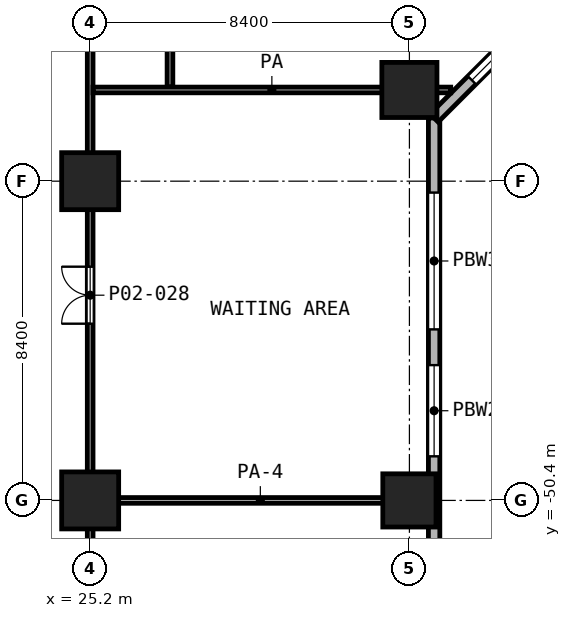
"""IFC4 building model, lengths in metres.
Left out: names, types, materials, properties, quantities, classifications, styles, units other than length and angle.
Written with IfcOpenShell. Run it as: python <this file> out.ifc"""

import sys

from ifc_helpers import new_model, si_unit, direction, frame, frame_2d, origin, origin_2d, place, context, subcontext, project, spatial, rectangle, extrude, element, fill, save


model = new_model("IFC4")
c1 = context("Model", 3, precision=1e-05, world=origin(), true_north=direction((0.0, 1.0)))
c2 = subcontext(c1, "Body", "Model", "MODEL_VIEW")
j1 = project(units=[si_unit("LENGTHUNIT", "METRE"), si_unit("PLANEANGLEUNIT", "RADIAN")], contexts=[c1])
p1 = place(None, origin())
s1 = spatial("IfcSite", under=j1, at=p1, CompositionType="ELEMENT")
p2 = place(p1, origin())
s2 = spatial("IfcBuilding", under=s1, at=p2, CompositionType="ELEMENT")
p3 = place(p2, frame((0.0, 0.0, 7.0)))
s3 = spatial("IfcBuildingStorey", under=s2, at=p3, CompositionType="ELEMENT", Elevation=7.0)
p4 = place(p3, frame((33.6, -39.6, 0.0), z_axis=(0.0, 0.0, 1.0), x_axis=(1.0, 0.0, 0.0)))
e1 = element("IfcColumn", 1, at=p4, inside=s3, PredefinedType="COLUMN", context=c2, shape_type="SweptSolid", body=[
    extrude(rectangle(XDim=1.45, YDim=1.45, at=origin_2d()), origin(), (0.0, 0.0, 1.0), 5.6),
])
for number, where, z_axis, x_axis in (
    (2, (25.2, -42.0, 0.0), (0.0, 0.0, 1.0), (1.0, 0.0, 0.0)),
    (3, (25.2, -50.4, 0.0), (0.0, 0.0, 1.0), (1.0, 0.0, 0.0)),
):
    element("IfcColumn", number, at=place(p3, frame(where, z_axis=z_axis, x_axis=x_axis)), inside=s3, PredefinedType="COLUMN", context=c2, shape_type="SweptSolid", body=[
        extrude(rectangle(XDim=1.5, YDim=1.5, at=origin_2d()), origin(), (0.0, 0.0, 1.0), 5.6),
    ])
p5 = place(p3, frame((33.6, -50.4, 0.0), z_axis=(0.0, 0.0, 1.0), x_axis=(1.0, 0.0, 0.0)))
e4 = element("IfcColumn", 4, at=p5, inside=s3, PredefinedType="COLUMN", context=c2, shape_type="SweptSolid", body=[
    extrude(rectangle(XDim=1.4, YDim=1.4, at=origin_2d()), origin(), (0.0, 0.0, 1.0), 5.6),
])
p6 = place(p3, frame((34.25, -78.738, 0.0), z_axis=(0.0, 0.0, 1.0), x_axis=(0.0, 1.0, 0.0)))
e5 = element("IfcWall", 5, at=p6, inside=s3, PredefinedType="SOLIDWALL", context=c2, shape_type="SweptSolid", body=[
    extrude(rectangle(XDim=38.4, YDim=0.3, at=frame_2d((19.2, 0.0))), origin(), (0.0, 0.0, 1.0), 5.25),
])
p7 = place(p6, frame((1.61, 0.0, 0.9)))
e6 = element("IfcOpeningElement", 6, at=p7, cuts=e5, PredefinedType="OPENING", context=c2, shape_type="SweptSolid", body=[
    extrude(rectangle(XDim=1.2, YDim=3.0, at=frame_2d((0.6, 1.5))), frame((0.0, 0.16, 0.0), z_axis=(0.0, -1.0, 0.0), x_axis=(1.0, 0.0, 0.0)), (0.0, 0.0, 1.0), 0.32),
])
p8 = place(p6, frame((3.438, 0.0, 0.9)))
e7 = element("IfcOpeningElement", 7, at=p8, cuts=e5, PredefinedType="OPENING", context=c2, shape_type="SweptSolid", body=[
    extrude(rectangle(XDim=3.6, YDim=3.0, at=frame_2d((1.8, 1.5))), frame((0.0, 0.16, 0.0), z_axis=(0.0, -1.0, 0.0), x_axis=(1.0, 0.0, 0.0)), (0.0, 0.0, 1.0), 0.32),
])
p9 = place(p6, frame((8.203, 0.0, 0.9)))
e8 = element("IfcOpeningElement", 8, at=p9, cuts=e5, PredefinedType="OPENING", context=c2, shape_type="SweptSolid", body=[
    extrude(rectangle(XDim=2.4, YDim=3.0, at=frame_2d((1.2, 1.5))), frame((0.0, 0.16, 0.0), z_axis=(0.0, -1.0, 0.0), x_axis=(1.0, 0.0, 0.0)), (0.0, 0.0, 1.0), 0.32),
])
p10 = place(p6, frame((12.623, 0.0, 0.9)))
e9 = element("IfcOpeningElement", 9, at=p10, cuts=e5, PredefinedType="OPENING", context=c2, shape_type="SweptSolid", body=[
    extrude(rectangle(XDim=2.4, YDim=3.0, at=frame_2d((1.2, 1.5))), frame((0.0, 0.16, 0.0), z_axis=(0.0, -1.0, 0.0), x_axis=(1.0, 0.0, 0.0)), (0.0, 0.0, 1.0), 0.32),
])
p11 = place(p6, frame((16.378, 0.0, 0.9)))
e10 = element("IfcOpeningElement", 10, at=p11, cuts=e5, PredefinedType="OPENING", context=c2, shape_type="SweptSolid", body=[
    extrude(rectangle(XDim=2.4, YDim=3.0, at=frame_2d((1.2, 1.5))), frame((0.0, 0.16, 0.0), z_axis=(0.0, -1.0, 0.0), x_axis=(1.0, 0.0, 0.0)), (0.0, 0.0, 1.0), 0.32),
])
p12 = place(p6, frame((21.098, 0.0, 0.9)))
e11 = element("IfcOpeningElement", 11, at=p12, cuts=e5, PredefinedType="OPENING", context=c2, shape_type="SweptSolid", body=[
    extrude(rectangle(XDim=2.4, YDim=3.0, at=frame_2d((1.2, 1.5))), frame((0.0, 0.16, 0.0), z_axis=(0.0, -1.0, 0.0), x_axis=(1.0, 0.0, 0.0)), (0.0, 0.0, 1.0), 0.32),
])
p13 = place(p6, frame((24.778, 0.0, 0.9)))
e12 = element("IfcOpeningElement", 12, at=p13, cuts=e5, PredefinedType="OPENING", context=c2, shape_type="SweptSolid", body=[
    extrude(rectangle(XDim=2.4, YDim=3.0, at=frame_2d((1.2, 1.5))), frame((0.0, 0.16, 0.0), z_axis=(0.0, -1.0, 0.0), x_axis=(1.0, 0.0, 0.0)), (0.0, 0.0, 1.0), 0.32),
])
p14 = place(p6, frame((29.498, 0.0, 0.9)))
e13 = element("IfcOpeningElement", 13, at=p14, cuts=e5, PredefinedType="OPENING", context=c2, shape_type="SweptSolid", body=[
    extrude(rectangle(XDim=2.4, YDim=3.0, at=frame_2d((1.2, 1.5))), frame((0.0, 0.16, 0.0), z_axis=(0.0, -1.0, 0.0), x_axis=(1.0, 0.0, 0.0)), (0.0, 0.0, 1.0), 0.32),
])
p15 = place(p6, frame((32.838, 0.0, 0.9)))
e14 = element("IfcOpeningElement", 14, at=p15, cuts=e5, PredefinedType="OPENING", context=c2, shape_type="SweptSolid", body=[
    extrude(rectangle(XDim=3.6, YDim=3.0, at=frame_2d((1.8, 1.5))), frame((0.0, 0.16, 0.0), z_axis=(0.0, -1.0, 0.0), x_axis=(1.0, 0.0, 0.0)), (0.0, 0.0, 1.0), 0.32),
])
p16 = place(p3, frame((34.25, -40.338, 0.0), z_axis=(0.0, 0.0, 1.0), x_axis=(0.707106781187, 0.707106781187, 0.0)))
e15 = element("IfcWall", 15, at=p16, inside=s3, PredefinedType="SOLIDWALL", context=c2, shape_type="SweptSolid", body=[
    extrude(rectangle(XDim=8.61, YDim=0.3, at=frame_2d((4.305, 0.0))), origin(), (0.0, 0.0, 1.0), 5.25),
])
p17 = place(p16, frame((1.406, 0.0, 0.9)))
e16 = element("IfcOpeningElement", 16, at=p17, cuts=e15, PredefinedType="OPENING", context=c2, shape_type="SweptSolid", body=[
    extrude(rectangle(XDim=2.4, YDim=3.0, at=frame_2d((1.2, 1.5))), frame((0.0, 0.16, 0.0), z_axis=(0.0, -1.0, 0.0), x_axis=(1.0, 0.0, 0.0)), (0.0, 0.0, 1.0), 0.32),
])
p18 = place(p16, frame((4.803, 0.0, 0.9)))
e17 = element("IfcOpeningElement", 17, at=p18, cuts=e15, PredefinedType="OPENING", context=c2, shape_type="SweptSolid", body=[
    extrude(rectangle(XDim=2.4, YDim=3.0, at=frame_2d((1.2, 1.5))), frame((0.0, 0.16, 0.0), z_axis=(0.0, -1.0, 0.0), x_axis=(1.0, 0.0, 0.0)), (0.0, 0.0, 1.0), 0.32),
])
p19 = place(p3, frame((25.275, -50.4, 0.0), z_axis=(0.0, 0.0, 1.0), x_axis=(1.0, 0.0, 0.0)))
e18 = element("IfcWall", 18, at=p19, inside=s3, PredefinedType="PARTITIONING", context=c2, shape_type="SweptSolid", body=[
    extrude(rectangle(XDim=8.805, YDim=0.15, at=frame_2d((4.403, 0.0))), origin(), (0.0, 0.0, 1.0), 4.35),
])
p20 = place(p3, frame((25.275, -39.6, 0.0), z_axis=(0.0, 0.0, 1.0), x_axis=(1.0, 0.0, 0.0)))
e19 = element("IfcWall", 19, at=p20, inside=s3, PredefinedType="PARTITIONING", context=c2, shape_type="SweptSolid", body=[
    extrude(rectangle(XDim=9.412, YDim=0.15, at=frame_2d((4.706, 0.0))), origin(), (0.0, 0.0, 1.0), 5.25),
])
p21 = place(p3, frame((25.2, -81.3, 0.0), z_axis=(0.0, 0.0, 1.0), x_axis=(0.0, 1.0, 0.0)))
e20 = element("IfcWall", 20, at=p21, inside=s3, PredefinedType="PARTITIONING", context=c2, shape_type="SweptSolid", body=[
    extrude(rectangle(XDim=46.95, YDim=0.15, at=frame_2d((23.475, 0.0))), origin(), (0.0, 0.0, 1.0), 5.25),
])
p22 = place(p21, frame((35.55, 0.0, 0.0)))
e21 = element("IfcOpeningElement", 21, at=p22, cuts=e20, PredefinedType="OPENING", context=c2, shape_type="SweptSolid", body=[
    extrude(rectangle(XDim=1.5, YDim=2.1, at=frame_2d((0.75, 1.05))), frame((0.0, 0.085, 0.0), z_axis=(0.0, -1.0, 0.0), x_axis=(1.0, 0.0, 0.0)), (0.0, 0.0, 1.0), 0.17),
])
p23 = place(p21, frame((26.2, 0.0, 0.0)))
e22 = element("IfcOpeningElement", 22, at=p23, cuts=e20, PredefinedType="OPENING", context=c2, shape_type="SweptSolid", body=[
    extrude(rectangle(XDim=1.0, YDim=2.1, at=frame_2d((0.5, 1.05))), frame((0.0, 0.085, 0.0), z_axis=(0.0, -1.0, 0.0), x_axis=(1.0, 0.0, 0.0)), (0.0, 0.0, 1.0), 0.17),
])
p24 = place(p21, frame((19.75, 0.0, 0.0)))
e23 = element("IfcOpeningElement", 23, at=p24, cuts=e20, PredefinedType="OPENING", context=c2, shape_type="SweptSolid", body=[
    extrude(rectangle(XDim=1.0, YDim=2.1, at=frame_2d((0.5, 1.05))), frame((0.0, 0.085, 0.0), z_axis=(0.0, -1.0, 0.0), x_axis=(1.0, 0.0, 0.0)), (0.0, 0.0, 1.0), 0.17),
])
p25 = place(p21, frame((15.55, 0.0, 0.0)))
e24 = element("IfcOpeningElement", 24, at=p25, cuts=e20, PredefinedType="OPENING", context=c2, shape_type="SweptSolid", body=[
    extrude(rectangle(XDim=1.0, YDim=2.1, at=frame_2d((0.5, 1.05))), frame((0.0, 0.085, 0.0), z_axis=(0.0, -1.0, 0.0), x_axis=(1.0, 0.0, 0.0)), (0.0, 0.0, 1.0), 0.17),
])
p26 = place(p21, frame((11.8, 0.0, 0.0)))
e25 = element("IfcOpeningElement", 25, at=p26, cuts=e20, PredefinedType="OPENING", context=c2, shape_type="SweptSolid", body=[
    extrude(rectangle(XDim=1.0, YDim=2.1, at=frame_2d((0.5, 1.05))), frame((0.0, 0.085, 0.0), z_axis=(0.0, -1.0, 0.0), x_axis=(1.0, 0.0, 0.0)), (0.0, 0.0, 1.0), 0.17),
])
p27 = place(p21, frame((6.5, 0.0, 0.0)))
e26 = element("IfcOpeningElement", 26, at=p27, cuts=e20, PredefinedType="OPENING", context=c2, shape_type="SweptSolid", body=[
    extrude(rectangle(XDim=1.0, YDim=2.1, at=frame_2d((0.5, 1.05))), frame((0.0, 0.085, 0.0), z_axis=(0.0, -1.0, 0.0), x_axis=(1.0, 0.0, 0.0)), (0.0, 0.0, 1.0), 0.17),
])
p28 = place(p3, frame((27.3, -39.525, 0.0), z_axis=(0.0, 0.0, 1.0), x_axis=(0.0, 1.0, 0.0)))
e27 = element("IfcWall", 27, at=p28, inside=s3, PredefinedType="PARTITIONING", context=c2, shape_type="SweptSolid", body=[
    extrude(rectangle(XDim=14.25, YDim=0.15, at=frame_2d((7.125, 0.0))), origin(), (0.0, 0.0, 1.0), 5.25),
])
p29 = place(p14, origin())
e28 = element("IfcWindow", 28, at=p29, inside=s3, PartitioningType="SINGLE_PANEL", PredefinedType="WINDOW", context=c2, shape_type="SweptSolid", body=[
    extrude(rectangle(XDim=2.4, YDim=3.0, at=frame_2d((1.2, 1.5))), frame((0.0, 0.03, 0.0), z_axis=(0.0, -1.0, 0.0), x_axis=(1.0, 0.0, 0.0)), (0.0, 0.0, 1.0), 0.06),
])
fill(e13, e28)
p30 = place(p15, origin())
e29 = element("IfcWindow", 29, at=p30, inside=s3, PartitioningType="SINGLE_PANEL", PredefinedType="WINDOW", context=c2, shape_type="SweptSolid", body=[
    extrude(rectangle(XDim=3.6, YDim=3.0, at=frame_2d((1.8, 1.5))), frame((0.0, 0.03, 0.0), z_axis=(0.0, -1.0, 0.0), x_axis=(1.0, 0.0, 0.0)), (0.0, 0.0, 1.0), 0.06),
])
fill(e14, e29)
p31 = place(p17, origin())
e30 = element("IfcWindow", 30, at=p31, inside=s3, PartitioningType="SINGLE_PANEL", PredefinedType="WINDOW", context=c2, shape_type="SweptSolid", body=[
    extrude(rectangle(XDim=2.4, YDim=3.0, at=frame_2d((1.2, 1.5))), frame((0.0, 0.03, 0.0), z_axis=(0.0, -1.0, 0.0), x_axis=(1.0, 0.0, 0.0)), (0.0, 0.0, 1.0), 0.06),
])
fill(e16, e30)
p32 = place(p22, origin())
e31 = element("IfcDoor", 31, at=p32, inside=s3, OperationType="DOUBLE_DOOR_SINGLE_SWING", PredefinedType="DOOR", context=c2, shape_type="SweptSolid", body=[
    extrude(rectangle(XDim=1.5, YDim=2.1, at=frame_2d((0.75, 1.05))), frame((0.0, 0.025, 0.0), z_axis=(0.0, -1.0, 0.0), x_axis=(1.0, 0.0, 0.0)), (0.0, 0.0, 1.0), 0.05),
])
fill(e21, e31)
save(model, sys.argv[1])
